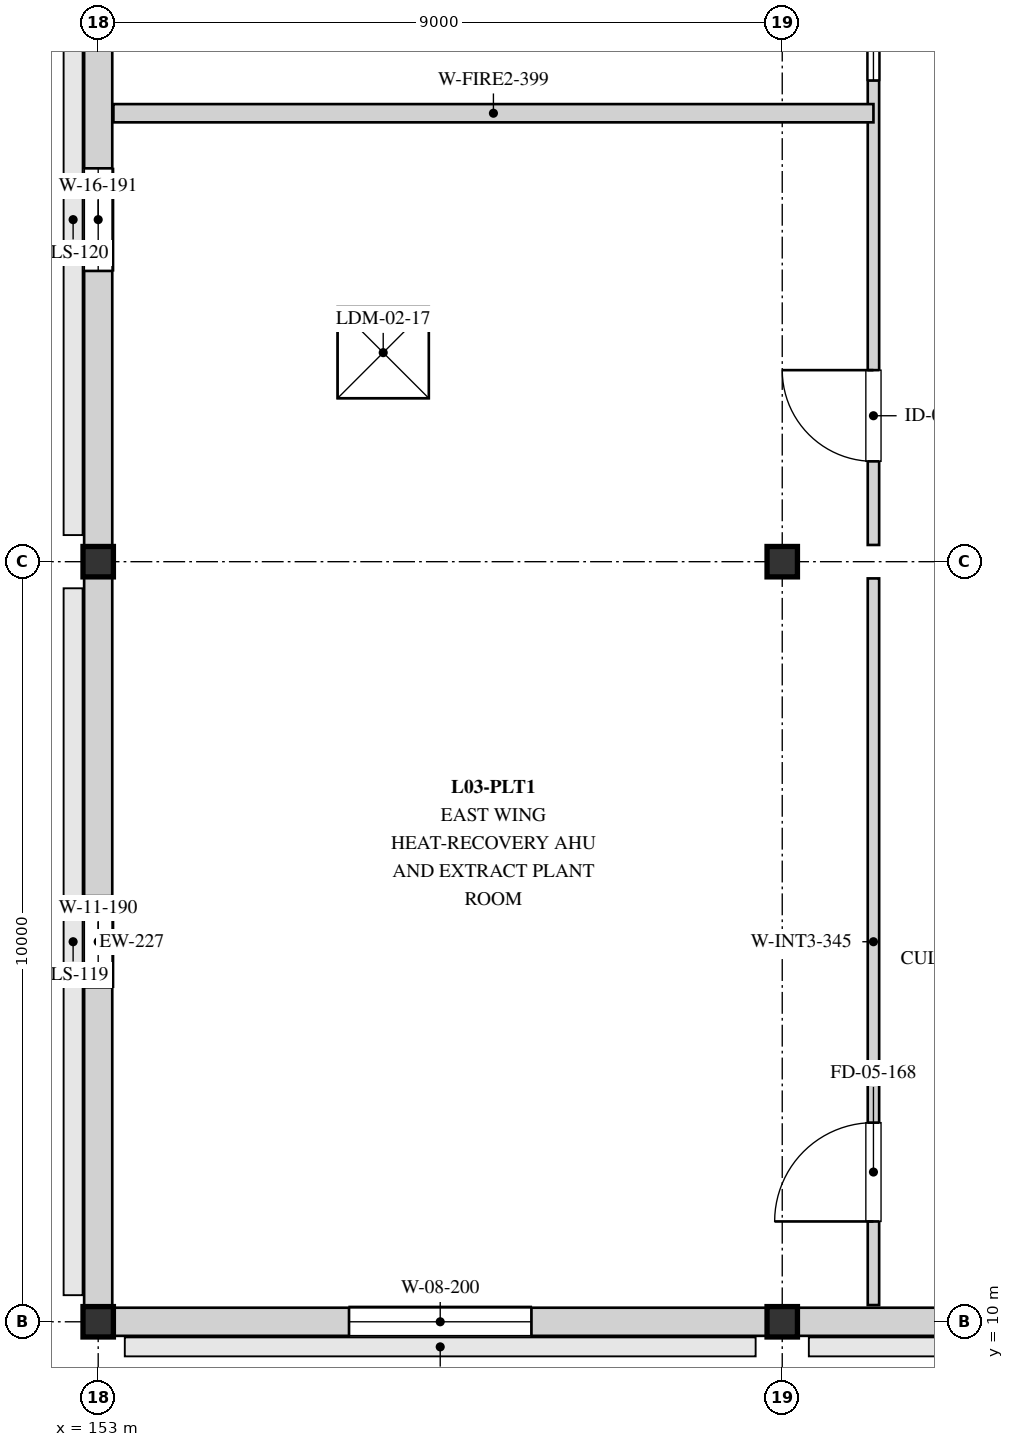
"""IFC4 building model, lengths in metres.
Left out: names, types, materials, properties, quantities, classifications, styles, units other than length and angle.
Written with IfcOpenShell. Run it as: python <this file> out.ifc"""

import sys

from ifc_helpers import new_model, si_unit, direction, frame, frame_2d, origin, origin_2d, place, context, subcontext, project, spatial, rectangle, extrude, element, fill, save


model = new_model("IFC4")
c1 = context("Model", 3, precision=1e-05, world=origin(), true_north=direction((0.0, 1.0)))
c2 = subcontext(c1, "Body", "Model", "MODEL_VIEW")
j1 = project(units=[si_unit("LENGTHUNIT", "METRE"), si_unit("PLANEANGLEUNIT", "RADIAN")], contexts=[c1])
p1 = place(None, origin())
s1 = spatial("IfcSite", under=j1, at=p1, CompositionType="ELEMENT")
p2 = place(p1, origin())
s2 = spatial("IfcBuilding", under=s1, at=p2, CompositionType="ELEMENT")
p3 = place(p2, frame((0.0, 0.0, 12.0)))
s3 = spatial("IfcBuildingStorey", under=s2, at=p3, CompositionType="ELEMENT", Elevation=12.0)
for number, where, z_axis, x_axis in (
    (1, (153.0, 10.0, 0.0), (0.0, 0.0, 1.0), (1.0, 0.0, 0.0)),
    (2, (153.0, 20.0, 0.0), (0.0, 0.0, 1.0), (1.0, 0.0, 0.0)),
):
    element("IfcColumn", number, at=place(p3, frame(where, z_axis=z_axis, x_axis=x_axis)), inside=s3, PredefinedType="COLUMN", context=c2, shape_type="SweptSolid", body=[
        extrude(rectangle(XDim=0.4, YDim=0.4, at=origin_2d()), origin(), (0.0, 0.0, 1.0), 3.08),
    ])
for number, where, z_axis, x_axis in (
    (3, (162.0, 10.0, 0.0), (0.0, 0.0, 1.0), (1.0, 0.0, 0.0)),
    (4, (162.0, 20.0, 0.0), (0.0, 0.0, 1.0), (1.0, 0.0, 0.0)),
):
    element("IfcColumn", number, at=place(p3, frame(where, z_axis=z_axis, x_axis=x_axis)), inside=s3, PredefinedType="COLUMN", context=c2, shape_type="SweptSolid", body=[
        extrude(rectangle(XDim=0.4, YDim=0.4, at=origin_2d()), origin(), (0.0, 0.0, 1.0), 5.08),
    ])
p4 = place(p3, frame((153.0, 10.0, 0.0), z_axis=(0.0, 0.0, 1.0), x_axis=(0.0, 1.0, 0.0)))
e5 = element("IfcWall", 5, at=p4, inside=s3, PredefinedType="STANDARD", context=c2, shape_type="SweptSolid", body=[
    extrude(rectangle(XDim=10.0, YDim=0.37, at=frame_2d((5.0, 0.0))), origin(), (0.0, 0.0, 1.0), 3.28),
])
p5 = place(p4, frame((4.4, 0.0, 0.9)))
e6 = element("IfcOpeningElement", 6, at=p5, cuts=e5, PredefinedType="OPENING", context=c2, shape_type="SweptSolid", body=[
    extrude(rectangle(XDim=1.2, YDim=1.8, at=frame_2d((0.6, 0.9))), frame((0.0, 0.195, 0.0), z_axis=(0.0, -1.0, 0.0), x_axis=(1.0, 0.0, 0.0)), (0.0, 0.0, 1.0), 0.39),
])
p6 = place(p3, frame((153.0, 20.0, 0.0), z_axis=(0.0, 0.0, 1.0), x_axis=(0.0, 1.0, 0.0)))
e7 = element("IfcWall", 7, at=p6, inside=s3, PredefinedType="STANDARD", context=c2, shape_type="SweptSolid", body=[
    extrude(rectangle(XDim=9.0, YDim=0.37, at=frame_2d((4.5, 0.0))), origin(), (0.0, 0.0, 1.0), 3.28),
])
p7 = place(p6, frame((3.825, 0.0, 0.9)))
e8 = element("IfcOpeningElement", 8, at=p7, cuts=e7, PredefinedType="OPENING", context=c2, shape_type="SweptSolid", body=[
    extrude(rectangle(XDim=1.35, YDim=1.6, at=frame_2d((0.675, 0.8))), frame((0.0, 0.195, 0.0), z_axis=(0.0, -1.0, 0.0), x_axis=(1.0, 0.0, 0.0)), (0.0, 0.0, 1.0), 0.39),
])
p8 = place(p3, frame((153.0, 10.0, 0.0), z_axis=(0.0, 0.0, 1.0), x_axis=(1.0, 0.0, 0.0)))
e9 = element("IfcWall", 9, at=p8, inside=s3, PredefinedType="STANDARD", context=c2, shape_type="SweptSolid", body=[
    extrude(rectangle(XDim=9.0, YDim=0.37, at=frame_2d((4.5, 0.0))), origin(), (0.0, 0.0, 1.0), 3.28),
])
p9 = place(p8, frame((3.3, 0.0, 0.9)))
e10 = element("IfcOpeningElement", 10, at=p9, cuts=e9, PredefinedType="OPENING", context=c2, shape_type="SweptSolid", body=[
    extrude(rectangle(XDim=2.4, YDim=2.0, at=frame_2d((1.2, 1.0))), frame((0.0, 0.195, 0.0), z_axis=(0.0, -1.0, 0.0), x_axis=(1.0, 0.0, 0.0)), (0.0, 0.0, 1.0), 0.39),
])
p10 = place(p3, frame((162.0, 10.0, 0.0), z_axis=(0.0, 0.0, 1.0), x_axis=(1.0, 0.0, 0.0)))
e11 = element("IfcWall", 11, at=p10, inside=s3, PredefinedType="STANDARD", context=c2, shape_type="SweptSolid", body=[
    extrude(rectangle(XDim=9.0, YDim=0.37, at=frame_2d((4.5, 0.0))), origin(), (0.0, 0.0, 1.0), 3.28),
])
p11 = place(p10, frame((3.3, 0.0, 0.9)))
e12 = element("IfcOpeningElement", 12, at=p11, cuts=e11, PredefinedType="OPENING", context=c2, shape_type="SweptSolid", body=[
    extrude(rectangle(XDim=2.4, YDim=2.0, at=frame_2d((1.2, 1.0))), frame((0.0, 0.195, 0.0), z_axis=(0.0, -1.0, 0.0), x_axis=(1.0, 0.0, 0.0)), (0.0, 0.0, 1.0), 0.39),
])
p12 = place(p3, frame((163.2, 10.22, 0.0), z_axis=(0.0, 0.0, 1.0), x_axis=(0.0, 1.0, 0.0)))
e13 = element("IfcWall", 13, at=p12, inside=s3, PredefinedType="PARTITIONING", context=c2, shape_type="SweptSolid", body=[
    extrude(rectangle(XDim=9.56, YDim=0.15, at=frame_2d((4.78, 0.0))), origin(), (0.0, 0.0, 1.0), 2.35),
])
p13 = place(p12, frame((1.1, 0.0, 0.0)))
e14 = element("IfcOpeningElement", 14, at=p13, cuts=e13, PredefinedType="OPENING", context=c2, shape_type="SweptSolid", body=[
    extrude(rectangle(XDim=1.3, YDim=2.2, at=frame_2d((0.65, 1.1))), frame((0.0, 0.085, 0.0), z_axis=(0.0, -1.0, 0.0), x_axis=(1.0, 0.0, 0.0)), (0.0, 0.0, 1.0), 0.17),
])
p14 = place(p3, frame((163.2, 20.22, 0.0), z_axis=(0.0, 0.0, 1.0), x_axis=(0.0, 1.0, 0.0)))
e15 = element("IfcWall", 15, at=p14, inside=s3, PredefinedType="PARTITIONING", context=c2, shape_type="SweptSolid", body=[
    extrude(rectangle(XDim=8.56, YDim=0.15, at=frame_2d((4.28, 0.0))), origin(), (0.0, 0.0, 1.0), 2.35),
])
p15 = place(p14, frame((1.1, 0.0, 0.0)))
e16 = element("IfcOpeningElement", 16, at=p15, cuts=e15, PredefinedType="OPENING", context=c2, shape_type="SweptSolid", body=[
    extrude(rectangle(XDim=1.2, YDim=2.15, at=frame_2d((0.6, 1.075))), frame((0.0, 0.085, 0.0), z_axis=(0.0, -1.0, 0.0), x_axis=(1.0, 0.0, 0.0)), (0.0, 0.0, 1.0), 0.17),
])
p16 = place(p14, frame((6.11, 0.0, 0.82)))
e17 = element("IfcOpeningElement", 17, at=p16, cuts=e15, PredefinedType="OPENING", context=c2, shape_type="SweptSolid", body=[
    extrude(rectangle(XDim=2.0, YDim=1.35, at=frame_2d((1.0, 0.675))), frame((0.0, 0.085, 0.0), z_axis=(0.0, -1.0, 0.0), x_axis=(1.0, 0.0, 0.0)), (0.0, 0.0, 1.0), 0.17),
])
p17 = place(p3, frame((153.2, 25.9, 0.0), z_axis=(0.0, 0.0, 1.0), x_axis=(1.0, 0.0, 0.0)))
e18 = element("IfcWall", 18, at=p17, inside=s3, PredefinedType="SOLIDWALL", context=c2, shape_type="SweptSolid", body=[
    extrude(rectangle(XDim=10.0, YDim=0.24, at=frame_2d((5.0, 0.0))), origin(), (0.0, 0.0, 1.0), 2.35),
])
p18 = place(p5, origin())
e19 = element("IfcWindow", 19, at=p18, inside=s3, PartitioningType="SINGLE_PANEL", PredefinedType="WINDOW", context=c2, shape_type="SweptSolid", body=[
    extrude(rectangle(XDim=1.2, YDim=1.8, at=frame_2d((0.6, 0.9))), frame((0.0, 0.03, 0.0), z_axis=(0.0, -1.0, 0.0), x_axis=(1.0, 0.0, 0.0)), (0.0, 0.0, 1.0), 0.06),
])
fill(e6, e19)
p19 = place(p7, origin())
e20 = element("IfcWindow", 20, at=p19, inside=s3, PartitioningType="SINGLE_PANEL", PredefinedType="WINDOW", context=c2, shape_type="SweptSolid", body=[
    extrude(rectangle(XDim=1.35, YDim=1.6, at=frame_2d((0.675, 0.8))), frame((0.0, 0.03, 0.0), z_axis=(0.0, -1.0, 0.0), x_axis=(1.0, 0.0, 0.0)), (0.0, 0.0, 1.0), 0.06),
])
fill(e8, e20)
p20 = place(p9, origin())
e21 = element("IfcWindow", 21, at=p20, inside=s3, PartitioningType="SINGLE_PANEL", PredefinedType="WINDOW", context=c2, shape_type="SweptSolid", body=[
    extrude(rectangle(XDim=2.4, YDim=2.0, at=frame_2d((1.2, 1.0))), frame((0.0, 0.03, 0.0), z_axis=(0.0, -1.0, 0.0), x_axis=(1.0, 0.0, 0.0)), (0.0, 0.0, 1.0), 0.06),
])
fill(e10, e21)
p21 = place(p3, frame((0.0, 0.0, -0.25)))
p22 = place(p21, frame((156.75, 22.75, -0.01)))
p23 = place(p22, frame((0.0, 0.0, 0.21)))
e22 = element("IfcWindow", 22, at=p23, inside=s3, PartitioningType="SINGLE_PANEL", PredefinedType="LIGHTDOME", context=c2, shape_type="SweptSolid", body=[
    extrude(rectangle(XDim=1.2, YDim=1.2, at=origin_2d()), origin(), (0.0, 0.0, 1.0), 0.05),
])
p24 = place(p13, origin())
e23 = element("IfcDoor", 23, at=p24, inside=s3, OperationType="SINGLE_SWING_LEFT", PredefinedType="DOOR", context=c2, shape_type="SweptSolid", body=[
    extrude(rectangle(XDim=1.3, YDim=2.2, at=frame_2d((0.65, 1.1))), frame((0.0, 0.025, 0.0), z_axis=(0.0, -1.0, 0.0), x_axis=(1.0, 0.0, 0.0)), (0.0, 0.0, 1.0), 0.05),
])
fill(e14, e23)
p25 = place(p15, origin())
e24 = element("IfcDoor", 24, at=p25, inside=s3, OperationType="SINGLE_SWING_RIGHT", PredefinedType="DOOR", context=c2, shape_type="SweptSolid", body=[
    extrude(rectangle(XDim=1.2, YDim=2.15, at=frame_2d((0.6, 1.075))), frame((0.0, 0.025, 0.0), z_axis=(0.0, -1.0, 0.0), x_axis=(1.0, 0.0, 0.0)), (0.0, 0.0, 1.0), 0.05),
])
fill(e16, e24)
p26 = place(p16, origin())
e25 = element("IfcWindow", 25, at=p26, inside=s3, PartitioningType="SINGLE_PANEL", PredefinedType="WINDOW", context=c2, shape_type="SweptSolid", body=[
    extrude(rectangle(XDim=2.0, YDim=1.35, at=frame_2d((1.0, 0.675))), frame((0.0, 0.03, 0.0), z_axis=(0.0, -1.0, 0.0), x_axis=(1.0, 0.0, 0.0)), (0.0, 0.0, 1.0), 0.06),
])
fill(e17, e25)
save(model, sys.argv[1])
